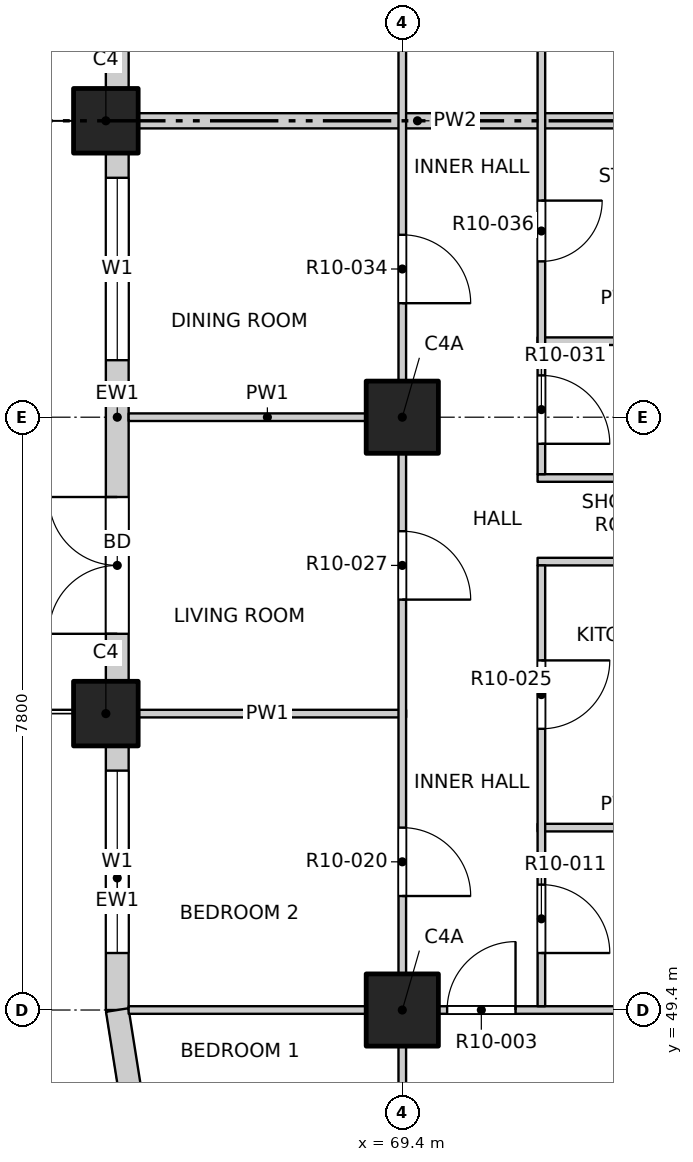
"""IFC4 building model, lengths in metres.
Left out: names, types, materials, properties, quantities, classifications, styles, units other than length and angle.
Written with IfcOpenShell. Run it as: python <this file> out.ifc"""

import sys

from ifc_helpers import new_model, si_unit, direction, frame, frame_2d, origin, origin_2d, place, context, subcontext, project, spatial, rectangle, extrude, element, fill, save


model = new_model("IFC4")
c1 = context("Model", 3, precision=1e-05, world=origin(), true_north=direction((0.0, 1.0)))
c2 = subcontext(c1, "Body", "Model", "MODEL_VIEW")
j1 = project(units=[si_unit("LENGTHUNIT", "METRE"), si_unit("PLANEANGLEUNIT", "RADIAN")], contexts=[c1])
p1 = place(None, origin())
s1 = spatial("IfcSite", under=j1, at=p1, CompositionType="ELEMENT")
p2 = place(p1, origin())
s2 = spatial("IfcBuilding", under=s1, at=p2, CompositionType="ELEMENT")
p3 = place(p2, frame((0.0, 0.0, 123.7)))
s3 = spatial("IfcBuildingStorey", under=s2, at=p3, CompositionType="ELEMENT", Elevation=123.7)
for number, where, z_axis, x_axis in (
    (1, (65.5, 53.3, -0.3), (0.0, 0.0, 1.0), (1.0, 0.0, 0.0)),
    (2, (65.5, 61.1, -0.3), (0.0, 0.0, 1.0), (1.0, 0.0, 0.0)),
):
    element("IfcColumn", number, at=place(p3, frame(where, z_axis=z_axis, x_axis=x_axis)), inside=s3, PredefinedType="COLUMN", context=c2, shape_type="SweptSolid", body=[
        extrude(rectangle(XDim=0.85, YDim=0.85, at=origin_2d()), origin(), (0.0, 0.0, 1.0), 3.45),
    ])
for number, where, z_axis, x_axis in (
    (3, (69.4, 49.4, -0.3), (0.0, 0.0, 1.0), (1.0, 0.0, 0.0)),
    (4, (69.4, 57.2, -0.3), (0.0, 0.0, 1.0), (1.0, 0.0, 0.0)),
):
    element("IfcColumn", number, at=place(p3, frame(where, z_axis=z_axis, x_axis=x_axis)), inside=s3, PredefinedType="COLUMN", context=c2, shape_type="SweptSolid", body=[
        extrude(rectangle(XDim=0.95, YDim=0.95, at=origin_2d()), origin(), (0.0, 0.0, 1.0), 3.45),
    ])
p4 = place(p3, frame((65.65, 49.4, 0.0), z_axis=(0.0, 0.0, 1.0), x_axis=(0.0, 1.0, 0.0)))
e5 = element("IfcWall", 5, at=p4, inside=s3, PredefinedType="SOLIDWALL", context=c2, shape_type="SweptSolid", body=[
    extrude(rectangle(XDim=3.475, YDim=0.3, at=frame_2d((1.738, 0.0))), origin(), (0.0, 0.0, 1.0), 2.7),
])
p5 = place(p4, frame((0.75, 0.0, 0.9)))
e6 = element("IfcOpeningElement", 6, at=p5, cuts=e5, PredefinedType="OPENING", context=c2, shape_type="SweptSolid", body=[
    extrude(rectangle(XDim=2.4, YDim=1.8, at=frame_2d((1.2, 0.9))), frame((0.0, 0.16, 0.0), z_axis=(0.0, -1.0, 0.0), x_axis=(1.0, 0.0, 0.0)), (0.0, 0.0, 1.0), 0.32),
])
p6 = place(p3, frame((65.65, 53.725, 0.0), z_axis=(0.0, 0.0, 1.0), x_axis=(0.0, 1.0, 0.0)))
e7 = element("IfcWall", 7, at=p6, inside=s3, PredefinedType="SOLIDWALL", context=c2, shape_type="SweptSolid", body=[
    extrude(rectangle(XDim=6.95, YDim=0.3, at=frame_2d((3.475, 0.0))), origin(), (0.0, 0.0, 1.0), 2.7),
])
p7 = place(p6, frame((0.625, 0.0, 0.0)))
e8 = element("IfcOpeningElement", 8, at=p7, cuts=e7, PredefinedType="OPENING", context=c2, shape_type="SweptSolid", body=[
    extrude(rectangle(XDim=1.8, YDim=2.4, at=frame_2d((0.9, 1.2))), frame((0.0, 0.16, 0.0), z_axis=(0.0, -1.0, 0.0), x_axis=(1.0, 0.0, 0.0)), (0.0, 0.0, 1.0), 0.32),
])
p8 = place(p6, frame((4.225, 0.0, 0.9)))
e9 = element("IfcOpeningElement", 9, at=p8, cuts=e7, PredefinedType="OPENING", context=c2, shape_type="SweptSolid", body=[
    extrude(rectangle(XDim=2.4, YDim=1.8, at=frame_2d((1.2, 0.9))), frame((0.0, 0.16, 0.0), z_axis=(0.0, -1.0, 0.0), x_axis=(1.0, 0.0, 0.0)), (0.0, 0.0, 1.0), 0.32),
])
p9 = place(p3, frame((65.65, 61.525, 0.0), z_axis=(0.0, 0.0, 1.0), x_axis=(0.0, 1.0, 0.0)))
e10 = element("IfcWall", 10, at=p9, inside=s3, PredefinedType="SOLIDWALL", context=c2, shape_type="SweptSolid", body=[
    extrude(rectangle(XDim=6.95, YDim=0.3, at=frame_2d((3.475, 0.0))), origin(), (0.0, 0.0, 1.0), 2.7),
])
p10 = place(p9, frame((0.625, 0.0, 0.0)))
e11 = element("IfcOpeningElement", 11, at=p10, cuts=e10, PredefinedType="OPENING", context=c2, shape_type="SweptSolid", body=[
    extrude(rectangle(XDim=1.8, YDim=2.4, at=frame_2d((0.9, 1.2))), frame((0.0, 0.16, 0.0), z_axis=(0.0, -1.0, 0.0), x_axis=(1.0, 0.0, 0.0)), (0.0, 0.0, 1.0), 0.32),
])
p11 = place(p9, frame((4.225, 0.0, 0.9)))
e12 = element("IfcOpeningElement", 12, at=p11, cuts=e10, PredefinedType="OPENING", context=c2, shape_type="SweptSolid", body=[
    extrude(rectangle(XDim=2.4, YDim=1.8, at=frame_2d((1.2, 0.9))), frame((0.0, 0.16, 0.0), z_axis=(0.0, -1.0, 0.0), x_axis=(1.0, 0.0, 0.0)), (0.0, 0.0, 1.0), 0.32),
])
p12 = place(p3, frame((65.65, 49.4, 0.0), z_axis=(0.0, 0.0, 1.0), x_axis=(0.156496880861, -0.987678452879, 0.0)))
e13 = element("IfcWall", 13, at=p12, inside=s3, PredefinedType="SOLIDWALL", context=c2, shape_type="SweptSolid", body=[
    extrude(rectangle(XDim=1.173, YDim=0.3, at=frame_2d((0.586, 0.0))), origin(), (0.0, 0.0, 1.0), 2.7),
])
p13 = place(p3, frame((65.8, 49.4, 0.0), z_axis=(0.0, 0.0, 1.0), x_axis=(1.0, 0.0, 0.0)))
e14 = element("IfcWall", 14, at=p13, inside=s3, PredefinedType="PARTITIONING", context=c2, shape_type="SweptSolid", body=[
    extrude(rectangle(XDim=38.4, YDim=0.1, at=frame_2d((19.2, 0.0))), origin(), (0.0, 0.0, 1.0), 3.15),
])
p14 = place(p13, frame((4.19, 0.0, 0.0)))
e15 = element("IfcOpeningElement", 15, at=p14, cuts=e14, PredefinedType="OPENING", context=c2, shape_type="SweptSolid", body=[
    extrude(rectangle(XDim=0.9, YDim=2.1, at=frame_2d((0.45, 1.05))), frame((0.0, 0.06, 0.0), z_axis=(0.0, -1.0, 0.0), x_axis=(1.0, 0.0, 0.0)), (0.0, 0.0, 1.0), 0.12),
])
p15 = place(p13, frame((9.0, 0.0, 0.0)))
e16 = element("IfcOpeningElement", 16, at=p15, cuts=e14, PredefinedType="OPENING", context=c2, shape_type="SweptSolid", body=[
    extrude(rectangle(XDim=0.9, YDim=2.1, at=frame_2d((0.45, 1.05))), frame((0.0, 0.06, 0.0), z_axis=(0.0, -1.0, 0.0), x_axis=(1.0, 0.0, 0.0)), (0.0, 0.0, 1.0), 0.12),
])
p16 = place(p13, frame((12.9, 0.0, 0.0)))
e17 = element("IfcOpeningElement", 17, at=p16, cuts=e14, PredefinedType="OPENING", context=c2, shape_type="SweptSolid", body=[
    extrude(rectangle(XDim=0.9, YDim=2.1, at=frame_2d((0.45, 1.05))), frame((0.0, 0.06, 0.0), z_axis=(0.0, -1.0, 0.0), x_axis=(1.0, 0.0, 0.0)), (0.0, 0.0, 1.0), 0.12),
])
p17 = place(p13, frame((16.8, 0.0, 0.0)))
e18 = element("IfcOpeningElement", 18, at=p17, cuts=e14, PredefinedType="OPENING", context=c2, shape_type="SweptSolid", body=[
    extrude(rectangle(XDim=0.9, YDim=2.1, at=frame_2d((0.45, 1.05))), frame((0.0, 0.06, 0.0), z_axis=(0.0, -1.0, 0.0), x_axis=(1.0, 0.0, 0.0)), (0.0, 0.0, 1.0), 0.12),
])
p18 = place(p13, frame((22.5, 0.0, 0.0)))
e19 = element("IfcOpeningElement", 19, at=p18, cuts=e14, PredefinedType="OPENING", context=c2, shape_type="SweptSolid", body=[
    extrude(rectangle(XDim=1.2, YDim=2.1, at=frame_2d((0.6, 1.05))), frame((0.0, 0.06, 0.0), z_axis=(0.0, -1.0, 0.0), x_axis=(1.0, 0.0, 0.0)), (0.0, 0.0, 1.0), 0.12),
])
p19 = place(p13, frame((28.5, 0.0, 0.0)))
e20 = element("IfcOpeningElement", 20, at=p19, cuts=e14, PredefinedType="OPENING", context=c2, shape_type="SweptSolid", body=[
    extrude(rectangle(XDim=0.9, YDim=2.1, at=frame_2d((0.45, 1.05))), frame((0.0, 0.06, 0.0), z_axis=(0.0, -1.0, 0.0), x_axis=(1.0, 0.0, 0.0)), (0.0, 0.0, 1.0), 0.12),
])
p20 = place(p13, frame((33.31, 0.0, 0.0)))
e21 = element("IfcOpeningElement", 21, at=p20, cuts=e14, PredefinedType="OPENING", context=c2, shape_type="SweptSolid", body=[
    extrude(rectangle(XDim=0.9, YDim=2.1, at=frame_2d((0.45, 1.05))), frame((0.0, 0.06, 0.0), z_axis=(0.0, -1.0, 0.0), x_axis=(1.0, 0.0, 0.0)), (0.0, 0.0, 1.0), 0.12),
])
p21 = place(p3, frame((71.18, 51.8, 0.0), z_axis=(0.0, 0.0, 1.0), x_axis=(1.0, 0.0, 0.0)))
e22 = element("IfcWall", 22, at=p21, inside=s3, PredefinedType="PARTITIONING", context=c2, shape_type="SweptSolid", body=[
    extrude(rectangle(XDim=2.22, YDim=0.1, at=frame_2d((1.11, 0.0))), origin(), (0.0, 0.0, 1.0), 3.15),
])
p22 = place(p3, frame((65.8, 53.3, 0.0), z_axis=(0.0, 0.0, 1.0), x_axis=(1.0, 0.0, 0.0)))
e23 = element("IfcWall", 23, at=p22, inside=s3, PredefinedType="PARTITIONING", context=c2, shape_type="SweptSolid", body=[
    extrude(rectangle(XDim=3.65, YDim=0.1, at=frame_2d((1.825, 0.0))), origin(), (0.0, 0.0, 1.0), 3.15),
])
for number, where, z_axis, x_axis in (
    (24, (71.18, 55.3, 0.0), (0.0, 0.0, 1.0), (1.0, 0.0, 0.0)),
    (25, (71.18, 56.4, 0.0), (0.0, 0.0, 1.0), (1.0, 0.0, 0.0)),
):
    element("IfcWall", number, at=place(p3, frame(where, z_axis=z_axis, x_axis=x_axis)), inside=s3, PredefinedType="PARTITIONING", context=c2, shape_type="SweptSolid", body=[
        extrude(rectangle(XDim=2.22, YDim=0.1, at=frame_2d((1.11, 0.0))), origin(), (0.0, 0.0, 1.0), 3.15),
    ])
p23 = place(p3, frame((65.8, 57.2, 0.0), z_axis=(0.0, 0.0, 1.0), x_axis=(1.0, 0.0, 0.0)))
e26 = element("IfcWall", 26, at=p23, inside=s3, PredefinedType="PARTITIONING", context=c2, shape_type="SweptSolid", body=[
    extrude(rectangle(XDim=3.65, YDim=0.1, at=frame_2d((1.825, 0.0))), origin(), (0.0, 0.0, 1.0), 3.15),
])
p24 = place(p3, frame((71.18, 58.2, 0.0), z_axis=(0.0, 0.0, 1.0), x_axis=(1.0, 0.0, 0.0)))
e27 = element("IfcWall", 27, at=p24, inside=s3, PredefinedType="PARTITIONING", context=c2, shape_type="SweptSolid", body=[
    extrude(rectangle(XDim=2.22, YDim=0.1, at=frame_2d((1.11, 0.0))), origin(), (0.0, 0.0, 1.0), 3.15),
])
p25 = place(p3, frame((65.8, 61.1, 0.0), z_axis=(0.0, 0.0, 1.0), x_axis=(1.0, 0.0, 0.0)))
e28 = element("IfcWall", 28, at=p25, inside=s3, PredefinedType="PARTITIONING", context=c2, shape_type="SweptSolid", body=[
    extrude(rectangle(XDim=7.6, YDim=0.2, at=frame_2d((3.8, 0.0))), origin(), (0.0, 0.0, 1.0), 2.55),
])
p26 = place(p3, frame((69.4, 45.8, 0.0), z_axis=(0.0, 0.0, 1.0), x_axis=(0.0, 1.0, 0.0)))
e29 = element("IfcWall", 29, at=p26, inside=s3, PredefinedType="PARTITIONING", context=c2, shape_type="SweptSolid", body=[
    extrude(rectangle(XDim=38.4, YDim=0.1, at=frame_2d((19.2, 0.0))), origin(), (0.0, 0.0, 1.0), 3.15),
])
p27 = place(p26, frame((1.05, 0.0, 0.0)))
e30 = element("IfcOpeningElement", 30, at=p27, cuts=e29, PredefinedType="OPENING", context=c2, shape_type="SweptSolid", body=[
    extrude(rectangle(XDim=1.2, YDim=2.1, at=frame_2d((0.6, 1.05))), frame((0.0, 0.06, 0.0), z_axis=(0.0, -1.0, 0.0), x_axis=(1.0, 0.0, 0.0)), (0.0, 0.0, 1.0), 0.12),
])
p28 = place(p26, frame((5.1, 0.0, 0.0)))
e31 = element("IfcOpeningElement", 31, at=p28, cuts=e29, PredefinedType="OPENING", context=c2, shape_type="SweptSolid", body=[
    extrude(rectangle(XDim=0.9, YDim=2.1, at=frame_2d((0.45, 1.05))), frame((0.0, 0.06, 0.0), z_axis=(0.0, -1.0, 0.0), x_axis=(1.0, 0.0, 0.0)), (0.0, 0.0, 1.0), 0.12),
])
p29 = place(p26, frame((9.0, 0.0, 0.0)))
e32 = element("IfcOpeningElement", 32, at=p29, cuts=e29, PredefinedType="OPENING", context=c2, shape_type="SweptSolid", body=[
    extrude(rectangle(XDim=0.9, YDim=2.1, at=frame_2d((0.45, 1.05))), frame((0.0, 0.06, 0.0), z_axis=(0.0, -1.0, 0.0), x_axis=(1.0, 0.0, 0.0)), (0.0, 0.0, 1.0), 0.12),
])
p30 = place(p26, frame((12.9, 0.0, 0.0)))
e33 = element("IfcOpeningElement", 33, at=p30, cuts=e29, PredefinedType="OPENING", context=c2, shape_type="SweptSolid", body=[
    extrude(rectangle(XDim=0.9, YDim=2.1, at=frame_2d((0.45, 1.05))), frame((0.0, 0.06, 0.0), z_axis=(0.0, -1.0, 0.0), x_axis=(1.0, 0.0, 0.0)), (0.0, 0.0, 1.0), 0.12),
])
p31 = place(p26, frame((19.775, 0.0, 0.0)))
e34 = element("IfcOpeningElement", 34, at=p31, cuts=e29, PredefinedType="OPENING", context=c2, shape_type="SweptSolid", body=[
    extrude(rectangle(XDim=1.2, YDim=2.1, at=frame_2d((0.6, 1.05))), frame((0.0, 0.06, 0.0), z_axis=(0.0, -1.0, 0.0), x_axis=(1.0, 0.0, 0.0)), (0.0, 0.0, 1.0), 0.12),
])
p32 = place(p26, frame((24.6, 0.0, 0.0)))
e35 = element("IfcOpeningElement", 35, at=p32, cuts=e29, PredefinedType="OPENING", context=c2, shape_type="SweptSolid", body=[
    extrude(rectangle(XDim=0.9, YDim=2.1, at=frame_2d((0.45, 1.05))), frame((0.0, 0.06, 0.0), z_axis=(0.0, -1.0, 0.0), x_axis=(1.0, 0.0, 0.0)), (0.0, 0.0, 1.0), 0.12),
])
p33 = place(p26, frame((30.3, 0.0, 0.0)))
e36 = element("IfcOpeningElement", 36, at=p33, cuts=e29, PredefinedType="OPENING", context=c2, shape_type="SweptSolid", body=[
    extrude(rectangle(XDim=1.2, YDim=2.1, at=frame_2d((0.6, 1.05))), frame((0.0, 0.06, 0.0), z_axis=(0.0, -1.0, 0.0), x_axis=(1.0, 0.0, 0.0)), (0.0, 0.0, 1.0), 0.12),
])
p34 = place(p26, frame((36.15, 0.0, 0.0)))
e37 = element("IfcOpeningElement", 37, at=p34, cuts=e29, PredefinedType="OPENING", context=c2, shape_type="SweptSolid", body=[
    extrude(rectangle(XDim=1.2, YDim=2.1, at=frame_2d((0.6, 1.05))), frame((0.0, 0.06, 0.0), z_axis=(0.0, -1.0, 0.0), x_axis=(1.0, 0.0, 0.0)), (0.0, 0.0, 1.0), 0.12),
])
p35 = place(p3, frame((71.23, 49.45, 0.0), z_axis=(0.0, 0.0, 1.0), x_axis=(0.0, 1.0, 0.0)))
e38 = element("IfcWall", 38, at=p35, inside=s3, PredefinedType="PARTITIONING", context=c2, shape_type="SweptSolid", body=[
    extrude(rectangle(XDim=5.8, YDim=0.1, at=frame_2d((2.9, 0.0))), origin(), (0.0, 0.0, 1.0), 3.15),
])
p36 = place(p35, frame((0.7, 0.0, 0.0)))
e39 = element("IfcOpeningElement", 39, at=p36, cuts=e38, PredefinedType="OPENING", context=c2, shape_type="SweptSolid", body=[
    extrude(rectangle(XDim=0.9, YDim=2.1, at=frame_2d((0.45, 1.05))), frame((0.0, 0.06, 0.0), z_axis=(0.0, -1.0, 0.0), x_axis=(1.0, 0.0, 0.0)), (0.0, 0.0, 1.0), 0.12),
])
p37 = place(p35, frame((3.65, 0.0, 0.0)))
e40 = element("IfcOpeningElement", 40, at=p37, cuts=e38, PredefinedType="OPENING", context=c2, shape_type="SweptSolid", body=[
    extrude(rectangle(XDim=0.9, YDim=2.1, at=frame_2d((0.45, 1.05))), frame((0.0, 0.06, 0.0), z_axis=(0.0, -1.0, 0.0), x_axis=(1.0, 0.0, 0.0)), (0.0, 0.0, 1.0), 0.12),
])
p38 = place(p3, frame((71.23, 56.45, 0.0), z_axis=(0.0, 0.0, 1.0), x_axis=(0.0, 1.0, 0.0)))
e41 = element("IfcWall", 41, at=p38, inside=s3, PredefinedType="PARTITIONING", context=c2, shape_type="SweptSolid", body=[
    extrude(rectangle(XDim=9.8, YDim=0.1, at=frame_2d((4.9, 0.0))), origin(), (0.0, 0.0, 1.0), 3.15),
])
p39 = place(p38, frame((0.4, 0.0, 0.0)))
e42 = element("IfcOpeningElement", 42, at=p39, cuts=e41, PredefinedType="OPENING", context=c2, shape_type="SweptSolid", body=[
    extrude(rectangle(XDim=0.9, YDim=2.1, at=frame_2d((0.45, 1.05))), frame((0.0, 0.06, 0.0), z_axis=(0.0, -1.0, 0.0), x_axis=(1.0, 0.0, 0.0)), (0.0, 0.0, 1.0), 0.12),
])
p40 = place(p38, frame((2.8, 0.0, 0.0)))
e43 = element("IfcOpeningElement", 43, at=p40, cuts=e41, PredefinedType="OPENING", context=c2, shape_type="SweptSolid", body=[
    extrude(rectangle(XDim=0.8, YDim=2.1, at=frame_2d((0.4, 1.05))), frame((0.0, 0.06, 0.0), z_axis=(0.0, -1.0, 0.0), x_axis=(1.0, 0.0, 0.0)), (0.0, 0.0, 1.0), 0.12),
])
p41 = place(p38, frame((5.65, 0.0, 0.0)))
e44 = element("IfcOpeningElement", 44, at=p41, cuts=e41, PredefinedType="OPENING", context=c2, shape_type="SweptSolid", body=[
    extrude(rectangle(XDim=0.8, YDim=2.1, at=frame_2d((0.4, 1.05))), frame((0.0, 0.06, 0.0), z_axis=(0.0, -1.0, 0.0), x_axis=(1.0, 0.0, 0.0)), (0.0, 0.0, 1.0), 0.12),
])
p42 = place(p38, frame((8.2, 0.0, 0.0)))
e45 = element("IfcOpeningElement", 45, at=p42, cuts=e41, PredefinedType="OPENING", context=c2, shape_type="SweptSolid", body=[
    extrude(rectangle(XDim=0.9, YDim=2.1, at=frame_2d((0.45, 1.05))), frame((0.0, 0.06, 0.0), z_axis=(0.0, -1.0, 0.0), x_axis=(1.0, 0.0, 0.0)), (0.0, 0.0, 1.0), 0.12),
])
p43 = place(p5, origin())
e46 = element("IfcWindow", 46, at=p43, inside=s3, PartitioningType="DOUBLE_PANEL_VERTICAL", PredefinedType="WINDOW", context=c2, shape_type="SweptSolid", body=[
    extrude(rectangle(XDim=2.4, YDim=1.8, at=frame_2d((1.2, 0.9))), frame((0.0, 0.03, 0.0), z_axis=(0.0, -1.0, 0.0), x_axis=(1.0, 0.0, 0.0)), (0.0, 0.0, 1.0), 0.06),
])
fill(e6, e46)
p44 = place(p7, origin())
e47 = element("IfcDoor", 47, at=p44, inside=s3, OperationType="DOUBLE_DOOR_SINGLE_SWING", PredefinedType="DOOR", context=c2, shape_type="SweptSolid", body=[
    extrude(rectangle(XDim=1.8, YDim=2.4, at=frame_2d((0.9, 1.2))), frame((0.0, 0.025, 0.0), z_axis=(0.0, -1.0, 0.0), x_axis=(1.0, 0.0, 0.0)), (0.0, 0.0, 1.0), 0.05),
])
fill(e8, e47)
p45 = place(p8, origin())
e48 = element("IfcWindow", 48, at=p45, inside=s3, PartitioningType="DOUBLE_PANEL_VERTICAL", PredefinedType="WINDOW", context=c2, shape_type="SweptSolid", body=[
    extrude(rectangle(XDim=2.4, YDim=1.8, at=frame_2d((1.2, 0.9))), frame((0.0, 0.03, 0.0), z_axis=(0.0, -1.0, 0.0), x_axis=(1.0, 0.0, 0.0)), (0.0, 0.0, 1.0), 0.06),
])
fill(e9, e48)
p46 = place(p14, origin())
e49 = element("IfcDoor", 49, at=p46, inside=s3, OperationType="SINGLE_SWING_RIGHT", PredefinedType="DOOR", context=c2, shape_type="SweptSolid", body=[
    extrude(rectangle(XDim=0.9, YDim=2.1, at=frame_2d((0.45, 1.05))), frame((0.0, 0.025, 0.0), z_axis=(0.0, -1.0, 0.0), x_axis=(1.0, 0.0, 0.0)), (0.0, 0.0, 1.0), 0.05),
])
fill(e15, e49)
p47 = place(p36, origin())
e50 = element("IfcDoor", 50, at=p47, inside=s3, OperationType="SINGLE_SWING_RIGHT", PredefinedType="DOOR", context=c2, shape_type="SweptSolid", body=[
    extrude(rectangle(XDim=0.9, YDim=2.1, at=frame_2d((0.45, 1.05))), frame((0.0, 0.025, 0.0), z_axis=(0.0, -1.0, 0.0), x_axis=(1.0, 0.0, 0.0)), (0.0, 0.0, 1.0), 0.05),
])
fill(e39, e50)
p48 = place(p28, origin())
e51 = element("IfcDoor", 51, at=p48, inside=s3, OperationType="SINGLE_SWING_RIGHT", PredefinedType="DOOR", context=c2, shape_type="SweptSolid", body=[
    extrude(rectangle(XDim=0.9, YDim=2.1, at=frame_2d((0.45, 1.05))), frame((0.0, 0.025, 0.0), z_axis=(0.0, -1.0, 0.0), x_axis=(1.0, 0.0, 0.0)), (0.0, 0.0, 1.0), 0.05),
])
fill(e31, e51)
p49 = place(p37, origin())
e52 = element("IfcDoor", 52, at=p49, inside=s3, OperationType="SINGLE_SWING_LEFT", PredefinedType="DOOR", context=c2, shape_type="SweptSolid", body=[
    extrude(rectangle(XDim=0.9, YDim=2.1, at=frame_2d((0.45, 1.05))), frame((0.0, 0.025, 0.0), z_axis=(0.0, -1.0, 0.0), x_axis=(1.0, 0.0, 0.0)), (0.0, 0.0, 1.0), 0.05),
])
fill(e40, e52)
p50 = place(p29, origin())
e53 = element("IfcDoor", 53, at=p50, inside=s3, OperationType="SINGLE_SWING_RIGHT", PredefinedType="DOOR", context=c2, shape_type="SweptSolid", body=[
    extrude(rectangle(XDim=0.9, YDim=2.1, at=frame_2d((0.45, 1.05))), frame((0.0, 0.025, 0.0), z_axis=(0.0, -1.0, 0.0), x_axis=(1.0, 0.0, 0.0)), (0.0, 0.0, 1.0), 0.05),
])
fill(e32, e53)
p51 = place(p39, origin())
e54 = element("IfcDoor", 54, at=p51, inside=s3, OperationType="SINGLE_SWING_RIGHT", PredefinedType="DOOR", context=c2, shape_type="SweptSolid", body=[
    extrude(rectangle(XDim=0.9, YDim=2.1, at=frame_2d((0.45, 1.05))), frame((0.0, 0.025, 0.0), z_axis=(0.0, -1.0, 0.0), x_axis=(1.0, 0.0, 0.0)), (0.0, 0.0, 1.0), 0.05),
])
fill(e42, e54)
p52 = place(p30, origin())
e55 = element("IfcDoor", 55, at=p52, inside=s3, OperationType="SINGLE_SWING_RIGHT", PredefinedType="DOOR", context=c2, shape_type="SweptSolid", body=[
    extrude(rectangle(XDim=0.9, YDim=2.1, at=frame_2d((0.45, 1.05))), frame((0.0, 0.025, 0.0), z_axis=(0.0, -1.0, 0.0), x_axis=(1.0, 0.0, 0.0)), (0.0, 0.0, 1.0), 0.05),
])
fill(e33, e55)
p53 = place(p40, origin())
e56 = element("IfcDoor", 56, at=p53, inside=s3, OperationType="SINGLE_SWING_LEFT", PredefinedType="DOOR", context=c2, shape_type="SweptSolid", body=[
    extrude(rectangle(XDim=0.8, YDim=2.1, at=frame_2d((0.4, 1.05))), frame((0.0, 0.025, 0.0), z_axis=(0.0, -1.0, 0.0), x_axis=(1.0, 0.0, 0.0)), (0.0, 0.0, 1.0), 0.05),
])
fill(e43, e56)
save(model, sys.argv[1])
